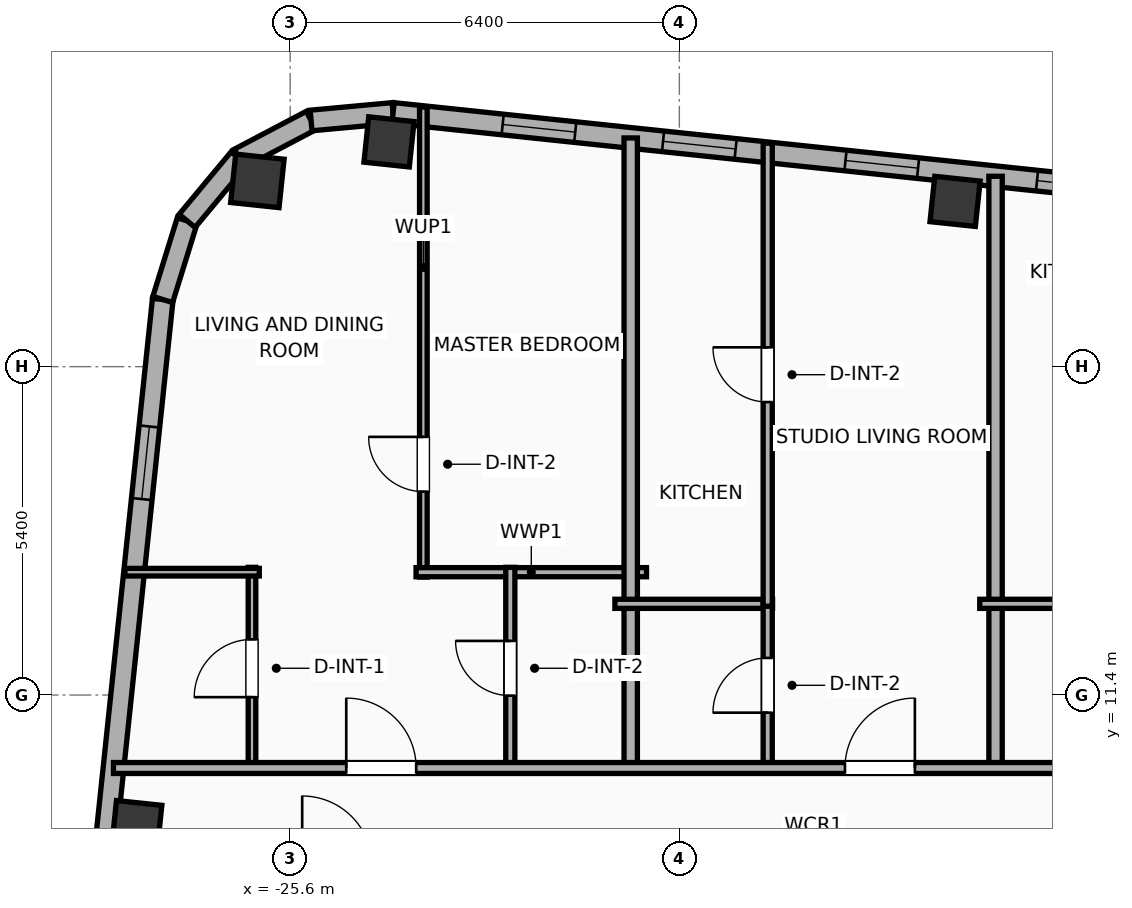
"""IFC4 building model, lengths in metres.
Left out: names, types, materials, properties, quantities, classifications, styles, units other than length and angle.
Written with IfcOpenShell. Run it as: python <this file> out.ifc"""

import sys

from ifc_helpers import new_model, si_unit, direction, frame, frame_2d, origin, origin_2d, place, context, subcontext, project, spatial, rectangle, hollow_rectangle, hollow_circle, extrude, element, fill, save


model = new_model("IFC4")
c1 = context("Model", 3, precision=1e-05, world=origin(), true_north=direction((0.0, 1.0)))
c2 = subcontext(c1, "Body", "Model", "MODEL_VIEW")
j1 = project(units=[si_unit("LENGTHUNIT", "METRE"), si_unit("PLANEANGLEUNIT", "RADIAN")], contexts=[c1])
p1 = place(None, origin())
s1 = spatial("IfcSite", under=j1, at=p1, CompositionType="ELEMENT")
p2 = place(p1, origin())
s2 = spatial("IfcBuilding", under=s1, at=p2, CompositionType="ELEMENT")
p3 = place(p2, frame((0.0, 0.0, 295.1)))
s3 = spatial("IfcBuildingStorey", under=s2, at=p3, CompositionType="ELEMENT", Elevation=295.1)
for number, where, z_axis, x_axis in (
    (1, (-14.666, 19.518, 0.0), (0.0, 0.0, 1.0), (0.995, -0.105, 0.0)),
    (2, (-23.975, 20.497, 0.0), (0.0, 0.0, 1.0), (0.995, -0.105, 0.0)),
):
    element("IfcColumn", number, at=place(p3, frame(where, z_axis=z_axis, x_axis=x_axis)), inside=s3, PredefinedType="COLUMN", context=c2, shape_type="SweptSolid", body=[
        extrude(hollow_rectangle(XDim=0.75, YDim=0.75, WallThickness=0.025, at=origin_2d()), origin(), (0.0, 0.0, 1.0), 3.9),
    ])
p4 = place(p3, frame((-26.139, 19.855, 0.0), z_axis=(0.0, 0.0, 1.0), x_axis=(0.994521895368, -0.104528463268, 0.0)))
e3 = element("IfcColumn", 3, at=p4, inside=s3, PredefinedType="COLUMN", context=c2, shape_type="SweptSolid", body=[
    extrude(hollow_circle(Radius=0.4, WallThickness=0.028, at=origin_2d()), origin(), (0.0, 0.0, 1.0), 3.9),
])
p5 = place(p3, frame((-28.123, 9.252, 0.0), z_axis=(0.0, 0.0, 1.0), x_axis=(0.994521895368, -0.104528463268, 0.0)))
e4 = element("IfcColumn", 4, at=p5, inside=s3, PredefinedType="COLUMN", context=c2, shape_type="SweptSolid", body=[
    extrude(hollow_rectangle(XDim=0.75, YDim=0.75, WallThickness=0.025, at=origin_2d()), origin(), (0.0, 0.0, 1.0), 3.9),
])
p6 = place(p3, frame((-30.87, -12.296, 0.0), z_axis=(0.0, 0.0, 1.0), x_axis=(0.104533282919, 0.994521388791, 0.0)))
e5 = element("IfcWall", 5, at=p6, inside=s3, PredefinedType="ELEMENTEDWALL", context=c2, shape_type="SweptSolid", body=[
    extrude(rectangle(XDim=30.366, YDim=0.34, at=frame_2d((15.183, 0.0))), origin(), (0.0, 0.0, 1.0), 3.635),
])
p7 = place(p6, frame((5.442, 0.0, 0.65)))
e6 = element("IfcOpeningElement", 6, at=p7, cuts=e5, PredefinedType="OPENING", context=c2, shape_type="SweptSolid", body=[
    extrude(rectangle(XDim=2.6, YDim=2.45, at=frame_2d((1.3, 1.225))), frame((0.0, 0.18, 0.0), z_axis=(0.0, -1.0, 0.0), x_axis=(1.0, 0.0, 0.0)), (0.0, 0.0, 1.0), 0.36),
])
p8 = place(p6, frame((27.067, 0.0, 0.75)))
e7 = element("IfcOpeningElement", 7, at=p8, cuts=e5, PredefinedType="OPENING", context=c2, shape_type="SweptSolid", body=[
    extrude(rectangle(XDim=1.2, YDim=2.05, at=frame_2d((0.6, 1.025))), frame((0.0, 0.18, 0.0), z_axis=(0.0, -1.0, 0.0), x_axis=(1.0, 0.0, 0.0)), (0.0, 0.0, 1.0), 0.36),
])
p9 = place(p6, frame((16.185, 0.0, 0.75)))
e8 = element("IfcOpeningElement", 8, at=p9, cuts=e5, PredefinedType="OPENING", context=c2, shape_type="SweptSolid", body=[
    extrude(rectangle(XDim=1.2, YDim=2.05, at=frame_2d((0.6, 1.025))), frame((0.0, 0.18, 0.0), z_axis=(0.0, -1.0, 0.0), x_axis=(1.0, 0.0, 0.0)), (0.0, 0.0, 1.0), 0.36),
])
p10 = place(p3, frame((-27.696, 17.905, 0.0), z_axis=(0.0, 0.0, 1.0), x_axis=(0.296416228123, 0.955058856671, 0.0)))
e9 = element("IfcWall", 9, at=p10, inside=s3, PredefinedType="ELEMENTEDWALL", context=c2, shape_type="SweptSolid", body=[
    extrude(rectangle(XDim=1.354, YDim=0.34, at=frame_2d((0.677, 0.0))), origin(), (0.0, 0.0, 1.0), 3.635),
])
p11 = place(p3, frame((-27.294, 19.198, 0.0), z_axis=(0.0, 0.0, 1.0), x_axis=(0.639501603217, 0.768789762863, 0.0)))
e10 = element("IfcWall", 10, at=p11, inside=s3, PredefinedType="ELEMENTEDWALL", context=c2, shape_type="SweptSolid", body=[
    extrude(rectangle(XDim=1.337, YDim=0.34, at=frame_2d((0.668, 0.0))), origin(), (0.0, 0.0, 1.0), 3.635),
])
p12 = place(p3, frame((-26.439, 20.226, 0.0), z_axis=(0.0, 0.0, 1.0), x_axis=(0.884922182678, 0.465738908193, 0.0)))
e11 = element("IfcWall", 11, at=p12, inside=s3, PredefinedType="ELEMENTEDWALL", context=c2, shape_type="SweptSolid", body=[
    extrude(rectangle(XDim=1.337, YDim=0.34, at=frame_2d((0.668, 0.0))), origin(), (0.0, 0.0, 1.0), 3.635),
])
p13 = place(p3, frame((-25.256, 20.848, 0.0), z_axis=(0.0, 0.0, 1.0), x_axis=(0.995813013343, 0.091413579172, 0.0)))
e12 = element("IfcWall", 12, at=p13, inside=s3, PredefinedType="ELEMENTEDWALL", context=c2, shape_type="SweptSolid", body=[
    extrude(rectangle(XDim=1.354, YDim=0.34, at=frame_2d((0.677, 0.0))), origin(), (0.0, 0.0, 1.0), 3.635),
])
p14 = place(p3, frame((-23.908, 20.972, 0.0), z_axis=(0.0, 0.0, 1.0), x_axis=(0.994521888554, -0.104528528102, 0.0)))
e13 = element("IfcWall", 13, at=p14, inside=s3, PredefinedType="ELEMENTEDWALL", context=c2, shape_type="SweptSolid", body=[
    extrude(rectangle(XDim=46.766, YDim=0.34, at=frame_2d((23.383, 0.0))), origin(), (0.0, 0.0, 1.0), 3.635),
])
p15 = place(p14, frame((22.933, 0.0, 0.65)))
e14 = element("IfcOpeningElement", 14, at=p15, cuts=e13, PredefinedType="OPENING", context=c2, shape_type="SweptSolid", body=[
    extrude(rectangle(XDim=2.6, YDim=2.45, at=frame_2d((1.3, 1.225))), frame((0.0, 0.18, 0.0), z_axis=(0.0, -1.0, 0.0), x_axis=(1.0, 0.0, 0.0)), (0.0, 0.0, 1.0), 0.36),
])
p16 = place(p14, frame((1.812, 0.0, 0.75)))
e15 = element("IfcOpeningElement", 15, at=p16, cuts=e13, PredefinedType="OPENING", context=c2, shape_type="SweptSolid", body=[
    extrude(rectangle(XDim=1.2, YDim=2.05, at=frame_2d((0.6, 1.025))), frame((0.0, 0.18, 0.0), z_axis=(0.0, -1.0, 0.0), x_axis=(1.0, 0.0, 0.0)), (0.0, 0.0, 1.0), 0.36),
])
p17 = place(p14, frame((7.481, 0.0, 0.75)))
e16 = element("IfcOpeningElement", 16, at=p17, cuts=e13, PredefinedType="OPENING", context=c2, shape_type="SweptSolid", body=[
    extrude(rectangle(XDim=1.2, YDim=2.05, at=frame_2d((0.6, 1.025))), frame((0.0, 0.18, 0.0), z_axis=(0.0, -1.0, 0.0), x_axis=(1.0, 0.0, 0.0)), (0.0, 0.0, 1.0), 0.36),
])
p18 = place(p14, frame((4.464, 0.0, 0.75)))
e17 = element("IfcOpeningElement", 17, at=p18, cuts=e13, PredefinedType="OPENING", context=c2, shape_type="SweptSolid", body=[
    extrude(rectangle(XDim=1.2, YDim=2.05, at=frame_2d((0.6, 1.025))), frame((0.0, 0.18, 0.0), z_axis=(0.0, -1.0, 0.0), x_axis=(1.0, 0.0, 0.0)), (0.0, 0.0, 1.0), 0.36),
])
p19 = place(p14, frame((13.665, 0.0, 0.75)))
e18 = element("IfcOpeningElement", 18, at=p19, cuts=e13, PredefinedType="OPENING", context=c2, shape_type="SweptSolid", body=[
    extrude(rectangle(XDim=1.2, YDim=2.05, at=frame_2d((0.6, 1.025))), frame((0.0, 0.18, 0.0), z_axis=(0.0, -1.0, 0.0), x_axis=(1.0, 0.0, 0.0)), (0.0, 0.0, 1.0), 0.36),
])
p20 = place(p14, frame((10.648, 0.0, 0.75)))
e19 = element("IfcOpeningElement", 19, at=p20, cuts=e13, PredefinedType="OPENING", context=c2, shape_type="SweptSolid", body=[
    extrude(rectangle(XDim=1.2, YDim=2.05, at=frame_2d((0.6, 1.025))), frame((0.0, 0.18, 0.0), z_axis=(0.0, -1.0, 0.0), x_axis=(1.0, 0.0, 0.0)), (0.0, 0.0, 1.0), 0.36),
])
p21 = place(p14, frame((19.254, 0.0, 0.75)))
e20 = element("IfcOpeningElement", 20, at=p21, cuts=e13, PredefinedType="OPENING", context=c2, shape_type="SweptSolid", body=[
    extrude(rectangle(XDim=1.2, YDim=2.05, at=frame_2d((0.6, 1.025))), frame((0.0, 0.18, 0.0), z_axis=(0.0, -1.0, 0.0), x_axis=(1.0, 0.0, 0.0)), (0.0, 0.0, 1.0), 0.36),
])
p22 = place(p14, frame((29.247, 0.0, 0.75)))
e21 = element("IfcOpeningElement", 21, at=p22, cuts=e13, PredefinedType="OPENING", context=c2, shape_type="SweptSolid", body=[
    extrude(rectangle(XDim=1.2, YDim=2.05, at=frame_2d((0.6, 1.025))), frame((0.0, 0.18, 0.0), z_axis=(0.0, -1.0, 0.0), x_axis=(1.0, 0.0, 0.0)), (0.0, 0.0, 1.0), 0.36),
])
p23 = place(p14, frame((32.264, 0.0, 0.75)))
e22 = element("IfcOpeningElement", 22, at=p23, cuts=e13, PredefinedType="OPENING", context=c2, shape_type="SweptSolid", body=[
    extrude(rectangle(XDim=1.2, YDim=2.05, at=frame_2d((0.6, 1.025))), frame((0.0, 0.18, 0.0), z_axis=(0.0, -1.0, 0.0), x_axis=(1.0, 0.0, 0.0)), (0.0, 0.0, 1.0), 0.36),
])
p24 = place(p14, frame((35.553, 0.0, 0.75)))
e23 = element("IfcOpeningElement", 23, at=p24, cuts=e13, PredefinedType="OPENING", context=c2, shape_type="SweptSolid", body=[
    extrude(rectangle(XDim=1.2, YDim=2.05, at=frame_2d((0.6, 1.025))), frame((0.0, 0.18, 0.0), z_axis=(0.0, -1.0, 0.0), x_axis=(1.0, 0.0, 0.0)), (0.0, 0.0, 1.0), 0.36),
])
p25 = place(p14, frame((42.402, 0.0, 0.75)))
e24 = element("IfcOpeningElement", 24, at=p25, cuts=e13, PredefinedType="OPENING", context=c2, shape_type="SweptSolid", body=[
    extrude(rectangle(XDim=1.2, YDim=2.05, at=frame_2d((0.6, 1.025))), frame((0.0, 0.18, 0.0), z_axis=(0.0, -1.0, 0.0), x_axis=(1.0, 0.0, 0.0)), (0.0, 0.0, 1.0), 0.36),
])
p26 = place(p3, frame((-23.41, 13.34, 0.0), z_axis=(0.0, 0.0, 1.0), x_axis=(0.0, 1.0, 0.0)))
e25 = element("IfcWall", 25, at=p26, inside=s3, PredefinedType="PARTITIONING", context=c2, shape_type="SweptSolid", body=[
    extrude(rectangle(XDim=7.731, YDim=0.125, at=frame_2d((3.865, 0.0))), origin(), (0.0, 0.0, 1.0), 3.075),
])
p27 = place(p26, frame((1.406, 0.0, 0.0)))
e26 = element("IfcOpeningElement", 26, at=p27, cuts=e25, PredefinedType="OPENING", context=c2, shape_type="SweptSolid", body=[
    extrude(rectangle(XDim=0.9, YDim=2.05, at=frame_2d((0.45, 1.025))), frame((0.0, 0.073, 0.0), z_axis=(0.0, -1.0, 0.0), x_axis=(1.0, 0.0, 0.0)), (0.0, 0.0, 1.0), 0.145),
])
p28 = place(p3, frame((-23.53, 13.42, 0.0), z_axis=(0.0, 0.0, 1.0), x_axis=(1.0, 0.0, 0.0)))
e27 = element("IfcWall", 27, at=p28, inside=s3, PredefinedType="PLUMBINGWALL", context=c2, shape_type="SweptSolid", body=[
    extrude(rectangle(XDim=3.79, YDim=0.15, at=frame_2d((1.895, 0.0))), origin(), (0.0, 0.0, 1.0), 3.635),
])
p29 = place(p3, frame((-26.228, 10.18, 0.0), z_axis=(0.0, 0.0, 1.0), x_axis=(0.0, 1.0, 0.0)))
e28 = element("IfcWall", 28, at=p29, inside=s3, PredefinedType="PARTITIONING", context=c2, shape_type="SweptSolid", body=[
    extrude(rectangle(XDim=3.32, YDim=0.125, at=frame_2d((1.66, 0.0))), origin(), (0.0, 0.0, 1.0), 3.635),
])
p30 = place(p29, frame((1.185, 0.0, 0.0)))
e29 = element("IfcOpeningElement", 29, at=p30, cuts=e28, PredefinedType="OPENING", context=c2, shape_type="SweptSolid", body=[
    extrude(rectangle(XDim=0.95, YDim=2.05, at=frame_2d((0.475, 1.025))), frame((0.0, 0.073, 0.0), z_axis=(0.0, -1.0, 0.0), x_axis=(1.0, 0.0, 0.0)), (0.0, 0.0, 1.0), 0.145),
])
p31 = place(p3, frame((-28.318, 13.42, 0.0), z_axis=(0.0, 0.0, 1.0), x_axis=(1.0, 0.0, 0.0)))
e30 = element("IfcWall", 30, at=p31, inside=s3, PredefinedType="PARTITIONING", context=c2, shape_type="SweptSolid", body=[
    extrude(rectangle(XDim=2.21, YDim=0.125, at=frame_2d((1.105, 0.0))), origin(), (0.0, 0.0, 1.0), 3.635),
])
p32 = place(p3, frame((-21.98, 10.18, 0.0), z_axis=(0.0, 0.0, 1.0), x_axis=(0.0, 1.0, 0.0)))
e31 = element("IfcWall", 31, at=p32, inside=s3, PredefinedType="PLUMBINGWALL", context=c2, shape_type="SweptSolid", body=[
    extrude(rectangle(XDim=3.32, YDim=0.15, at=frame_2d((1.66, 0.0))), origin(), (0.0, 0.0, 1.0), 3.635),
])
p33 = place(p32, frame((1.21, 0.0, 0.0)))
e32 = element("IfcOpeningElement", 32, at=p33, cuts=e31, PredefinedType="OPENING", context=c2, shape_type="SweptSolid", body=[
    extrude(rectangle(XDim=0.9, YDim=2.05, at=frame_2d((0.45, 1.025))), frame((0.0, 0.085, 0.0), z_axis=(0.0, -1.0, 0.0), x_axis=(1.0, 0.0, 0.0)), (0.0, 0.0, 1.0), 0.17),
])
p34 = place(p3, frame((-20.0, 10.12, 0.0), z_axis=(0.0, 0.0, 1.0), x_axis=(0.0, 1.0, 0.0)))
e33 = element("IfcWall", 33, at=p34, inside=s3, PredefinedType="PARTITIONING", context=c2, shape_type="SweptSolid", body=[
    extrude(rectangle(XDim=10.441, YDim=0.22, at=frame_2d((5.221, 0.0))), origin(), (0.0, 0.0, 1.0), 3.635),
])
p35 = place(p3, frame((-20.26, 12.9, 0.0), z_axis=(0.0, 0.0, 1.0), x_axis=(1.0, 0.0, 0.0)))
e34 = element("IfcWall", 34, at=p35, inside=s3, PredefinedType="PLUMBINGWALL", context=c2, shape_type="SweptSolid", body=[
    extrude(rectangle(XDim=2.593, YDim=0.15, at=frame_2d((1.296, 0.0))), origin(), (0.0, 0.0, 1.0), 3.635),
])
p36 = place(p3, frame((-17.747, 10.18, 0.0), z_axis=(0.0, 0.0, 1.0), x_axis=(0.0, 1.0, 0.0)))
e35 = element("IfcWall", 35, at=p36, inside=s3, PredefinedType="PLUMBINGWALL", context=c2, shape_type="SweptSolid", body=[
    extrude(rectangle(XDim=2.76, YDim=0.15, at=frame_2d((1.38, 0.0))), origin(), (0.0, 0.0, 1.0), 3.635),
])
p37 = place(p36, frame((0.93, 0.0, 0.0)))
e36 = element("IfcOpeningElement", 36, at=p37, cuts=e35, PredefinedType="OPENING", context=c2, shape_type="SweptSolid", body=[
    extrude(rectangle(XDim=0.9, YDim=2.05, at=frame_2d((0.45, 1.025))), frame((0.0, 0.085, 0.0), z_axis=(0.0, -1.0, 0.0), x_axis=(1.0, 0.0, 0.0)), (0.0, 0.0, 1.0), 0.17),
])
p38 = place(p3, frame((-17.747, 12.86, 0.0), z_axis=(0.0, 0.0, 1.0), x_axis=(0.0, 1.0, 0.0)))
e37 = element("IfcWall", 37, at=p38, inside=s3, PredefinedType="PLUMBINGWALL", context=c2, shape_type="SweptSolid", body=[
    extrude(rectangle(XDim=7.615, YDim=0.15, at=frame_2d((3.808, 0.0))), origin(), (0.0, 0.0, 1.0), 3.635),
])
p39 = place(p38, frame((3.358, 0.0, 0.0)))
e38 = element("IfcOpeningElement", 38, at=p39, cuts=e37, PredefinedType="OPENING", context=c2, shape_type="SweptSolid", body=[
    extrude(rectangle(XDim=0.9, YDim=2.05, at=frame_2d((0.45, 1.025))), frame((0.0, 0.085, 0.0), z_axis=(0.0, -1.0, 0.0), x_axis=(1.0, 0.0, 0.0)), (0.0, 0.0, 1.0), 0.17),
])
p40 = place(p3, frame((-14.0, 10.12, 0.0), z_axis=(0.0, 0.0, 1.0), x_axis=(0.0, 1.0, 0.0)))
e39 = element("IfcWall", 39, at=p40, inside=s3, PredefinedType="PARTITIONING", context=c2, shape_type="SweptSolid", body=[
    extrude(rectangle(XDim=9.811, YDim=0.22, at=frame_2d((4.905, 0.0))), origin(), (0.0, 0.0, 1.0), 3.635),
])
p41 = place(p3, frame((-14.26, 12.9, 0.0), z_axis=(0.0, 0.0, 1.0), x_axis=(1.0, 0.0, 0.0)))
e40 = element("IfcWall", 40, at=p41, inside=s3, PredefinedType="PLUMBINGWALL", context=c2, shape_type="SweptSolid", body=[
    extrude(rectangle(XDim=2.893, YDim=0.15, at=frame_2d((1.447, 0.0))), origin(), (0.0, 0.0, 1.0), 3.635),
])
p42 = place(p3, frame((-28.506, 10.2, 0.0), z_axis=(0.0, 0.0, 1.0), x_axis=(1.0, 0.0, 0.0)))
e41 = element("IfcWall", 41, at=p42, inside=s3, PredefinedType="PARTITIONING", context=c2, shape_type="SweptSolid", body=[
    extrude(rectangle(XDim=53.956, YDim=0.18, at=frame_2d((26.978, 0.0))), origin(), (0.0, 0.0, 1.0), 3.635),
])
p43 = place(p42, frame((3.828, 0.0, 0.0)))
e42 = element("IfcOpeningElement", 42, at=p43, cuts=e41, PredefinedType="OPENING", context=c2, shape_type="SweptSolid", body=[
    extrude(rectangle(XDim=1.15, YDim=2.05, at=frame_2d((0.575, 1.025))), frame((0.0, 0.1, 0.0), z_axis=(0.0, -1.0, 0.0), x_axis=(1.0, 0.0, 0.0)), (0.0, 0.0, 1.0), 0.2),
])
p44 = place(p42, frame((12.029, 0.0, 0.0)))
e43 = element("IfcOpeningElement", 43, at=p44, cuts=e41, PredefinedType="OPENING", context=c2, shape_type="SweptSolid", body=[
    extrude(rectangle(XDim=1.15, YDim=2.05, at=frame_2d((0.575, 1.025))), frame((0.0, 0.1, 0.0), z_axis=(0.0, -1.0, 0.0), x_axis=(1.0, 0.0, 0.0)), (0.0, 0.0, 1.0), 0.2),
])
p45 = place(p42, frame((18.175, 0.0, 0.0)))
e44 = element("IfcOpeningElement", 44, at=p45, cuts=e41, PredefinedType="OPENING", context=c2, shape_type="SweptSolid", body=[
    extrude(rectangle(XDim=1.15, YDim=2.05, at=frame_2d((0.575, 1.025))), frame((0.0, 0.1, 0.0), z_axis=(0.0, -1.0, 0.0), x_axis=(1.0, 0.0, 0.0)), (0.0, 0.0, 1.0), 0.2),
])
p46 = place(p42, frame((23.183, 0.0, 0.0)))
e45 = element("IfcOpeningElement", 45, at=p46, cuts=e41, PredefinedType="OPENING", context=c2, shape_type="SweptSolid", body=[
    extrude(rectangle(XDim=0.9, YDim=2.05, at=frame_2d((0.45, 1.025))), frame((0.0, 0.1, 0.0), z_axis=(0.0, -1.0, 0.0), x_axis=(1.0, 0.0, 0.0)), (0.0, 0.0, 1.0), 0.2),
])
p47 = place(p42, frame((29.182, 0.0, 0.0)))
e46 = element("IfcOpeningElement", 46, at=p47, cuts=e41, PredefinedType="OPENING", context=c2, shape_type="SweptSolid", body=[
    extrude(rectangle(XDim=0.9, YDim=2.05, at=frame_2d((0.45, 1.025))), frame((0.0, 0.1, 0.0), z_axis=(0.0, -1.0, 0.0), x_axis=(1.0, 0.0, 0.0)), (0.0, 0.0, 1.0), 0.2),
])
p48 = place(p42, frame((33.735, 0.0, 0.0)))
e47 = element("IfcOpeningElement", 47, at=p48, cuts=e41, PredefinedType="OPENING", context=c2, shape_type="SweptSolid", body=[
    extrude(rectangle(XDim=1.15, YDim=2.05, at=frame_2d((0.575, 1.025))), frame((0.0, 0.1, 0.0), z_axis=(0.0, -1.0, 0.0), x_axis=(1.0, 0.0, 0.0)), (0.0, 0.0, 1.0), 0.2),
])
p49 = place(p42, frame((41.182, 0.0, 0.0)))
e48 = element("IfcOpeningElement", 48, at=p49, cuts=e41, PredefinedType="OPENING", context=c2, shape_type="SweptSolid", body=[
    extrude(rectangle(XDim=0.9, YDim=2.05, at=frame_2d((0.45, 1.025))), frame((0.0, 0.1, 0.0), z_axis=(0.0, -1.0, 0.0), x_axis=(1.0, 0.0, 0.0)), (0.0, 0.0, 1.0), 0.2),
])
p50 = place(p42, frame((49.114, 0.0, 0.0)))
e49 = element("IfcOpeningElement", 49, at=p50, cuts=e41, PredefinedType="OPENING", context=c2, shape_type="SweptSolid", body=[
    extrude(rectangle(XDim=0.9, YDim=2.05, at=frame_2d((0.45, 1.025))), frame((0.0, 0.1, 0.0), z_axis=(0.0, -1.0, 0.0), x_axis=(1.0, 0.0, 0.0)), (0.0, 0.0, 1.0), 0.2),
])
p51 = place(p8, origin())
e50 = element("IfcWindow", 50, at=p51, inside=s3, PartitioningType="SINGLE_PANEL", PredefinedType="WINDOW", context=c2, shape_type="SweptSolid", body=[
    extrude(rectangle(XDim=1.2, YDim=2.05, at=frame_2d((0.6, 1.025))), frame((0.0, 0.03, 0.0), z_axis=(0.0, -1.0, 0.0), x_axis=(1.0, 0.0, 0.0)), (0.0, 0.0, 1.0), 0.06),
])
fill(e7, e50)
p52 = place(p16, origin())
e51 = element("IfcWindow", 51, at=p52, inside=s3, PartitioningType="SINGLE_PANEL", PredefinedType="WINDOW", context=c2, shape_type="SweptSolid", body=[
    extrude(rectangle(XDim=1.2, YDim=2.05, at=frame_2d((0.6, 1.025))), frame((0.0, 0.03, 0.0), z_axis=(0.0, -1.0, 0.0), x_axis=(1.0, 0.0, 0.0)), (0.0, 0.0, 1.0), 0.06),
])
fill(e15, e51)
p53 = place(p17, origin())
e52 = element("IfcWindow", 52, at=p53, inside=s3, PartitioningType="SINGLE_PANEL", PredefinedType="WINDOW", context=c2, shape_type="SweptSolid", body=[
    extrude(rectangle(XDim=1.2, YDim=2.05, at=frame_2d((0.6, 1.025))), frame((0.0, 0.03, 0.0), z_axis=(0.0, -1.0, 0.0), x_axis=(1.0, 0.0, 0.0)), (0.0, 0.0, 1.0), 0.06),
])
fill(e16, e52)
p54 = place(p18, origin())
e53 = element("IfcWindow", 53, at=p54, inside=s3, PartitioningType="SINGLE_PANEL", PredefinedType="WINDOW", context=c2, shape_type="SweptSolid", body=[
    extrude(rectangle(XDim=1.2, YDim=2.05, at=frame_2d((0.6, 1.025))), frame((0.0, 0.03, 0.0), z_axis=(0.0, -1.0, 0.0), x_axis=(1.0, 0.0, 0.0)), (0.0, 0.0, 1.0), 0.06),
])
fill(e17, e53)
p55 = place(p20, origin())
e54 = element("IfcWindow", 54, at=p55, inside=s3, PartitioningType="SINGLE_PANEL", PredefinedType="WINDOW", context=c2, shape_type="SweptSolid", body=[
    extrude(rectangle(XDim=1.2, YDim=2.05, at=frame_2d((0.6, 1.025))), frame((0.0, 0.03, 0.0), z_axis=(0.0, -1.0, 0.0), x_axis=(1.0, 0.0, 0.0)), (0.0, 0.0, 1.0), 0.06),
])
fill(e19, e54)
p56 = place(p27, origin())
e55 = element("IfcDoor", 55, at=p56, inside=s3, OperationType="SINGLE_SWING_RIGHT", PredefinedType="DOOR", context=c2, shape_type="SweptSolid", body=[
    extrude(rectangle(XDim=0.9, YDim=2.05, at=frame_2d((0.45, 1.025))), frame((0.0, 0.025, 0.0), z_axis=(0.0, -1.0, 0.0), x_axis=(1.0, 0.0, 0.0)), (0.0, 0.0, 1.0), 0.05),
])
fill(e26, e55)
p57 = place(p30, origin())
e56 = element("IfcDoor", 56, at=p57, inside=s3, OperationType="SINGLE_SWING_LEFT", PredefinedType="DOOR", context=c2, shape_type="SweptSolid", body=[
    extrude(rectangle(XDim=0.95, YDim=2.05, at=frame_2d((0.475, 1.025))), frame((0.0, 0.025, 0.0), z_axis=(0.0, -1.0, 0.0), x_axis=(1.0, 0.0, 0.0)), (0.0, 0.0, 1.0), 0.05),
])
fill(e29, e56)
p58 = place(p33, origin())
e57 = element("IfcDoor", 57, at=p58, inside=s3, OperationType="SINGLE_SWING_RIGHT", PredefinedType="DOOR", context=c2, shape_type="SweptSolid", body=[
    extrude(rectangle(XDim=0.9, YDim=2.05, at=frame_2d((0.45, 1.025))), frame((0.0, 0.025, 0.0), z_axis=(0.0, -1.0, 0.0), x_axis=(1.0, 0.0, 0.0)), (0.0, 0.0, 1.0), 0.05),
])
fill(e32, e57)
p59 = place(p37, origin())
e58 = element("IfcDoor", 58, at=p59, inside=s3, OperationType="SINGLE_SWING_LEFT", PredefinedType="DOOR", context=c2, shape_type="SweptSolid", body=[
    extrude(rectangle(XDim=0.9, YDim=2.05, at=frame_2d((0.45, 1.025))), frame((0.0, 0.025, 0.0), z_axis=(0.0, -1.0, 0.0), x_axis=(1.0, 0.0, 0.0)), (0.0, 0.0, 1.0), 0.05),
])
fill(e36, e58)
p60 = place(p39, origin())
e59 = element("IfcDoor", 59, at=p60, inside=s3, OperationType="SINGLE_SWING_RIGHT", PredefinedType="DOOR", context=c2, shape_type="SweptSolid", body=[
    extrude(rectangle(XDim=0.9, YDim=2.05, at=frame_2d((0.45, 1.025))), frame((0.0, 0.025, 0.0), z_axis=(0.0, -1.0, 0.0), x_axis=(1.0, 0.0, 0.0)), (0.0, 0.0, 1.0), 0.05),
])
fill(e38, e59)
p61 = place(p43, origin())
e60 = element("IfcDoor", 60, at=p61, inside=s3, OperationType="SINGLE_SWING_LEFT", PredefinedType="DOOR", context=c2, shape_type="SweptSolid", body=[
    extrude(rectangle(XDim=1.15, YDim=2.05, at=frame_2d((0.575, 1.025))), frame((0.0, 0.025, 0.0), z_axis=(0.0, -1.0, 0.0), x_axis=(1.0, 0.0, 0.0)), (0.0, 0.0, 1.0), 0.05),
])
fill(e42, e60)
p62 = place(p44, origin())
e61 = element("IfcDoor", 61, at=p62, inside=s3, OperationType="SINGLE_SWING_RIGHT", PredefinedType="DOOR", context=c2, shape_type="SweptSolid", body=[
    extrude(rectangle(XDim=1.15, YDim=2.05, at=frame_2d((0.575, 1.025))), frame((0.0, 0.025, 0.0), z_axis=(0.0, -1.0, 0.0), x_axis=(1.0, 0.0, 0.0)), (0.0, 0.0, 1.0), 0.05),
])
fill(e43, e61)
save(model, sys.argv[1])
